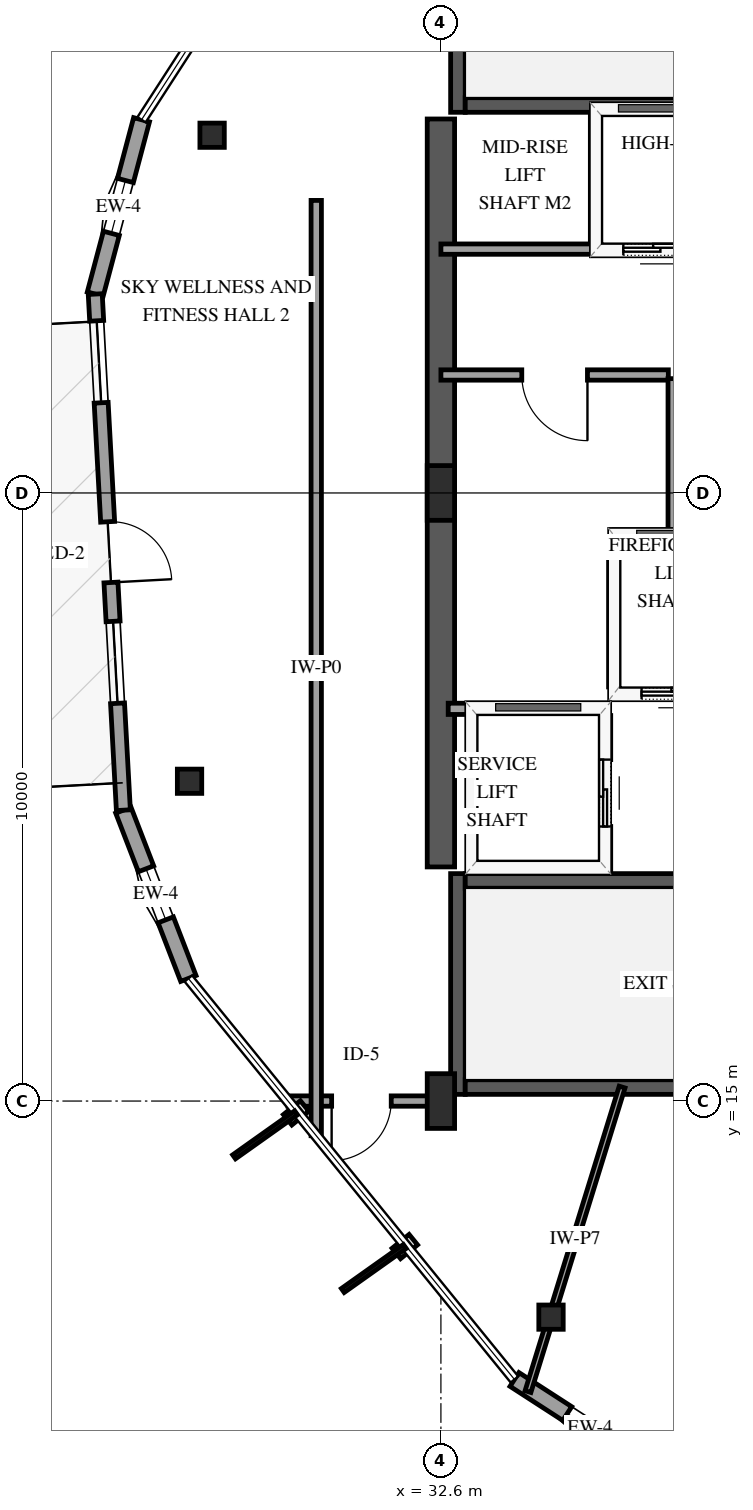
"""IFC4 building model, lengths in metres.
Left out: names, types, materials, properties, quantities, classifications, styles, units other than length and angle.
Written with IfcOpenShell. Run it as: python <this file> out.ifc"""

import sys

from ifc_helpers import new_model, si_unit, direction, frame, frame_2d, origin, origin_2d, place, context, subcontext, project, spatial, rectangle, i_section, extrude, element, fill, save


model = new_model("IFC4")
c1 = context("Model", 3, precision=1e-05, world=origin(), true_north=direction((0.0, 1.0)))
c2 = subcontext(c1, "Body", "Model", "MODEL_VIEW")
j1 = project(units=[si_unit("LENGTHUNIT", "METRE"), si_unit("PLANEANGLEUNIT", "RADIAN")], contexts=[c1])
p1 = place(None, origin())
s1 = spatial("IfcSite", under=j1, at=p1, CompositionType="ELEMENT")
p2 = place(p1, origin())
s2 = spatial("IfcBuilding", under=s1, at=p2, CompositionType="ELEMENT")
p3 = place(p2, frame((0.0, 0.0, 242.5)))
s3 = spatial("IfcBuildingStorey", under=s2, at=p3, CompositionType="ELEMENT", Elevation=242.5)
p4 = place(p3, frame((32.88, 15.11, 0.0), z_axis=(0.0, 0.0, 1.0), x_axis=(0.0, 1.0, 0.0)))
e1 = element("IfcWall", 1, at=p4, inside=s3, PredefinedType="SHEAR", context=c2, shape_type="SweptSolid", body=[
    extrude(rectangle(XDim=3.63, YDim=0.24, at=frame_2d((1.815, 0.0))), origin(), (0.0, 0.0, 1.0), 3.75),
])
for number, where, z_axis, x_axis in (
    (2, (33.0, 15.23, 0.0), (0.0, 0.0, 1.0), (1.0, 0.0, 0.0)),
    (3, (33.0, 18.62, 0.0), (0.0, 0.0, 1.0), (1.0, 0.0, 0.0)),
):
    element("IfcWall", number, at=place(p3, frame(where, z_axis=z_axis, x_axis=x_axis)), inside=s3, PredefinedType="SHEAR", context=c2, shape_type="SweptSolid", body=[
        extrude(rectangle(XDim=8.0, YDim=0.24, at=frame_2d((4.0, 0.0))), origin(), (0.0, 0.0, 1.0), 3.75),
    ])
p5 = place(p3, frame((32.88, 31.26, 0.0), z_axis=(0.0, 0.0, 1.0), x_axis=(0.0, 1.0, 0.0)))
e4 = element("IfcWall", 4, at=p5, inside=s3, PredefinedType="SHEAR", context=c2, shape_type="SweptSolid", body=[
    extrude(rectangle(XDim=3.63, YDim=0.24, at=frame_2d((1.815, 0.0))), origin(), (0.0, 0.0, 1.0), 3.75),
])
p6 = place(p3, frame((33.0, 31.38, 0.0), z_axis=(0.0, 0.0, 1.0), x_axis=(1.0, 0.0, 0.0)))
e5 = element("IfcWall", 5, at=p6, inside=s3, PredefinedType="SHEAR", context=c2, shape_type="SweptSolid", body=[
    extrude(rectangle(XDim=8.0, YDim=0.24, at=frame_2d((4.0, 0.0))), origin(), (0.0, 0.0, 1.0), 3.75),
])
p7 = place(p3, frame((32.6, 18.85, 0.0), z_axis=(0.0, 0.0, 1.0), x_axis=(0.0, 1.0, 0.0)))
e6 = element("IfcWall", 6, at=p7, inside=s3, PredefinedType="SHEAR", context=c2, shape_type="SweptSolid", body=[
    extrude(rectangle(XDim=12.3, YDim=0.45, at=frame_2d((6.15, 0.0))), origin(), (0.0, 0.0, 1.0), 3.75),
])
for number, where, z_axis, x_axis in (
    (7, (32.6, 15.0, -0.3), (0.0, 0.0, 1.0), (1.0, 0.0, 0.0)),
    (8, (32.6, 25.0, -0.3), (0.0, 0.0, 1.0), (1.0, 0.0, 0.0)),
):
    element("IfcColumn", number, at=place(p3, frame(where, z_axis=z_axis, x_axis=x_axis)), inside=s3, PredefinedType="PILASTER", context=c2, shape_type="SweptSolid", body=[
        extrude(rectangle(XDim=0.45, YDim=0.9, at=origin_2d()), origin(), (0.0, 0.0, 1.0), 4.05),
    ])
for number, where, z_axis, x_axis in (
    (9, (28.837, 30.883, -0.3), (0.0, 0.0, 1.0), (1.0, 0.0, 0.0)),
    (10, (28.466, 20.259, -0.3), (0.0, 0.0, 1.0), (1.0, 0.0, 0.0)),
    (11, (34.411, 11.446, -0.3), (0.0, 0.0, 1.0), (1.0, 0.0, 0.0)),
):
    element("IfcColumn", number, at=place(p3, frame(where, z_axis=z_axis, x_axis=x_axis)), inside=s3, PredefinedType="COLUMN", context=c2, shape_type="SweptSolid", body=[
        extrude(i_section(OverallWidth=0.401, OverallDepth=0.399, WebThickness=0.025, FlangeThickness=0.04, FilletRadius=0.038, at=origin_2d()), origin(), (0.0, 0.0, 1.0), 4.05),
    ])
p8 = place(p3, frame((27.677, 31.137, 0.0), z_axis=(0.0, 0.0, 1.0), x_axis=(-0.256781470725, -0.966469490616, 0.0)))
e12 = element("IfcWall", 12, at=p8, inside=s3, PredefinedType="SOLIDWALL", context=c2, shape_type="SweptSolid", body=[
    extrude(rectangle(XDim=2.966, YDim=0.27, at=frame_2d((1.483, 0.0))), origin(), (0.0, 0.0, 1.0), 2.829),
])
p9 = place(p8, frame((1.033, 0.0, 0.75)))
e13 = element("IfcOpeningElement", 13, at=p9, cuts=e12, PredefinedType="OPENING", context=c2, shape_type="SweptSolid", body=[
    extrude(rectangle(XDim=0.9, YDim=1.5, at=frame_2d((0.45, 0.75))), frame((0.0, 0.145, 0.0), z_axis=(0.0, -1.0, 0.0), x_axis=(1.0, 0.0, 0.0)), (0.0, 0.0, 1.0), 0.29),
])
p10 = place(p3, frame((27.378, 19.783, 0.0), z_axis=(0.0, 0.0, 1.0), x_axis=(0.3603683584, -0.93281008049, 0.0)))
e14 = element("IfcWall", 14, at=p10, inside=s3, PredefinedType="SOLIDWALL", context=c2, shape_type="SweptSolid", body=[
    extrude(rectangle(XDim=2.967, YDim=0.27, at=frame_2d((1.483, 0.0))), origin(), (0.0, 0.0, 1.0), 2.829),
])
p11 = place(p10, frame((1.033, 0.0, 0.75)))
e15 = element("IfcOpeningElement", 15, at=p11, cuts=e14, PredefinedType="OPENING", context=c2, shape_type="SweptSolid", body=[
    extrude(rectangle(XDim=0.9, YDim=1.5, at=frame_2d((0.45, 0.75))), frame((0.0, 0.145, 0.0), z_axis=(0.0, -1.0, 0.0), x_axis=(1.0, 0.0, 0.0)), (0.0, 0.0, 1.0), 0.29),
])
p12 = place(p3, frame((26.915, 28.271, 0.0), z_axis=(0.0, 0.0, 1.0), x_axis=(0.05442960739, -0.99851761018, 0.0)))
e16 = element("IfcWall", 16, at=p12, inside=s3, PredefinedType="SOLIDWALL", context=c2, shape_type="SweptSolid", body=[
    extrude(rectangle(XDim=8.5, YDim=0.23, at=frame_2d((4.25, 0.0))), origin(), (0.0, 0.0, 1.0), 2.829),
])
p13 = place(p12, frame((3.75, 0.0, 0.0)))
e17 = element("IfcOpeningElement", 17, at=p13, cuts=e16, PredefinedType="OPENING", context=c2, shape_type="SweptSolid", body=[
    extrude(rectangle(XDim=1.0, YDim=2.15, at=frame_2d((0.5, 1.075))), frame((0.0, 0.125, 0.0), z_axis=(0.0, -1.0, 0.0), x_axis=(1.0, 0.0, 0.0)), (0.0, 0.0, 1.0), 0.25),
])
p14 = place(p12, frame((0.44, 0.0, 0.72)))
e18 = element("IfcOpeningElement", 18, at=p14, cuts=e16, PredefinedType="OPENING", context=c2, shape_type="SweptSolid", body=[
    extrude(rectangle(XDim=1.35, YDim=1.65, at=frame_2d((0.675, 0.825))), frame((0.0, 0.125, 0.0), z_axis=(0.0, -1.0, 0.0), x_axis=(1.0, 0.0, 0.0)), (0.0, 0.0, 1.0), 0.25),
])
p15 = place(p12, frame((5.39, 0.0, 0.72)))
e19 = element("IfcOpeningElement", 19, at=p15, cuts=e16, PredefinedType="OPENING", context=c2, shape_type="SweptSolid", body=[
    extrude(rectangle(XDim=1.35, YDim=1.65, at=frame_2d((0.675, 0.825))), frame((0.0, 0.125, 0.0), z_axis=(0.0, -1.0, 0.0), x_axis=(1.0, 0.0, 0.0)), (0.0, 0.0, 1.0), 0.25),
])
p16 = place(p3, frame((33.81, 10.422, 0.0), z_axis=(0.0, 0.0, 1.0), x_axis=(0.839779856866, -0.54292705956, 0.0)))
e20 = element("IfcWall", 20, at=p16, inside=s3, PredefinedType="SOLIDWALL", context=c2, shape_type="SweptSolid", body=[
    extrude(rectangle(XDim=2.967, YDim=0.27, at=frame_2d((1.483, 0.0))), origin(), (0.0, 0.0, 1.0), 2.829),
])
p17 = place(p16, frame((1.033, 0.0, 0.75)))
e21 = element("IfcOpeningElement", 21, at=p17, cuts=e20, PredefinedType="OPENING", context=c2, shape_type="SweptSolid", body=[
    extrude(rectangle(XDim=0.9, YDim=1.5, at=frame_2d((0.45, 0.75))), frame((0.0, 0.145, 0.0), z_axis=(0.0, -1.0, 0.0), x_axis=(1.0, 0.0, 0.0)), (0.0, 0.0, 1.0), 0.29),
])
p18 = place(p3, frame((35.45, 21.7, 0.0), z_axis=(0.0, 0.0, 1.0), x_axis=(1.0, 0.0, 0.0)))
e22 = element("IfcWall", 22, at=p18, inside=s3, PredefinedType="SOLIDWALL", context=c2, shape_type="SweptSolid", body=[
    extrude(rectangle(XDim=2.0, YDim=0.185, at=frame_2d((1.0, 0.0))), origin(), (0.0, 0.0, 1.0), 3.45),
])
p19 = place(p18, frame((0.45, 0.0, 0.0)))
e23 = element("IfcOpeningElement", 23, at=p19, cuts=e22, PredefinedType="OPENING", context=c2, shape_type="SweptSolid", body=[
    extrude(rectangle(XDim=1.1, YDim=2.15, at=frame_2d((0.55, 1.075))), frame((0.0, 0.103, 0.0), z_axis=(0.0, -1.0, 0.0), x_axis=(1.0, 0.0, 0.0)), (0.0, 0.0, 1.0), 0.205),
])
p20 = place(p3, frame((35.45, 24.3, 0.0), z_axis=(0.0, 0.0, 1.0), x_axis=(1.0, 0.0, 0.0)))
e24 = element("IfcWall", 24, at=p20, inside=s3, PredefinedType="SOLIDWALL", context=c2, shape_type="SweptSolid", body=[
    extrude(rectangle(XDim=2.0, YDim=0.185, at=frame_2d((1.0, 0.0))), origin(), (0.0, 0.0, 1.0), 3.45),
])
p21 = place(p3, frame((35.45, 21.81, 0.0), z_axis=(0.0, 0.0, 1.0), x_axis=(0.0, 1.0, 0.0)))
e25 = element("IfcWall", 25, at=p21, inside=s3, PredefinedType="SOLIDWALL", context=c2, shape_type="SweptSolid", body=[
    extrude(rectangle(XDim=2.38, YDim=0.185, at=frame_2d((1.19, 0.0))), origin(), (0.0, 0.0, 1.0), 3.45),
])
p22 = place(p3, frame((32.72, 21.45, 0.0), z_axis=(0.0, 0.0, 1.0), x_axis=(1.0, 0.0, 0.0)))
e26 = element("IfcWall", 26, at=p22, inside=s3, PredefinedType="SOLIDWALL", context=c2, shape_type="SweptSolid", body=[
    extrude(rectangle(XDim=2.58, YDim=0.185, at=frame_2d((1.29, 0.0))), origin(), (0.0, 0.0, 1.0), 3.45),
])
p23 = place(p3, frame((35.3, 18.79, 0.0), z_axis=(0.0, 0.0, 1.0), x_axis=(0.0, 1.0, 0.0)))
e27 = element("IfcWall", 27, at=p23, inside=s3, PredefinedType="SOLIDWALL", context=c2, shape_type="SweptSolid", body=[
    extrude(rectangle(XDim=2.55, YDim=0.185, at=frame_2d((1.275, 0.0))), origin(), (0.0, 0.0, 1.0), 3.45),
])
p24 = place(p23, frame((0.725, 0.0, 0.0)))
e28 = element("IfcOpeningElement", 28, at=p24, cuts=e27, PredefinedType="OPENING", context=c2, shape_type="SweptSolid", body=[
    extrude(rectangle(XDim=1.1, YDim=2.15, at=frame_2d((0.55, 1.075))), frame((0.0, 0.103, 0.0), z_axis=(0.0, -1.0, 0.0), x_axis=(1.0, 0.0, 0.0)), (0.0, 0.0, 1.0), 0.205),
])
p25 = place(p3, frame((35.15, 29.0, 0.0), z_axis=(0.0, 0.0, 1.0), x_axis=(1.0, 0.0, 0.0)))
e29 = element("IfcWall", 29, at=p25, inside=s3, PredefinedType="SOLIDWALL", context=c2, shape_type="SweptSolid", body=[
    extrude(rectangle(XDim=2.0, YDim=0.185, at=frame_2d((1.0, 0.0))), origin(), (0.0, 0.0, 1.0), 3.45),
])
p26 = place(p25, frame((0.45, 0.0, 0.0)))
e30 = element("IfcOpeningElement", 30, at=p26, cuts=e29, PredefinedType="OPENING", context=c2, shape_type="SweptSolid", body=[
    extrude(rectangle(XDim=1.1, YDim=2.15, at=frame_2d((0.55, 1.075))), frame((0.0, 0.103, 0.0), z_axis=(0.0, -1.0, 0.0), x_axis=(1.0, 0.0, 0.0)), (0.0, 0.0, 1.0), 0.205),
])
p27 = place(p3, frame((35.15, 29.11, 0.0), z_axis=(0.0, 0.0, 1.0), x_axis=(0.0, 1.0, 0.0)))
e31 = element("IfcWall", 31, at=p27, inside=s3, PredefinedType="SOLIDWALL", context=c2, shape_type="SweptSolid", body=[
    extrude(rectangle(XDim=2.1, YDim=0.185, at=frame_2d((1.05, 0.0))), origin(), (0.0, 0.0, 1.0), 3.45),
])
p28 = place(p3, frame((35.58, 15.23, 0.0), z_axis=(0.0, 0.0, 1.0), x_axis=(-0.295332551785, -0.955394517389, 0.0)))
e32 = element("IfcWall", 32, at=p28, inside=s3, PredefinedType="PARTITIONING", context=c2, shape_type="SweptSolid", body=[
    extrude(rectangle(XDim=5.242, YDim=0.1, at=frame_2d((2.621, 0.0))), origin(), (0.0, 0.0, 1.0), 2.745),
])
p29 = place(p3, frame((36.34, 26.94, 0.0), z_axis=(0.0, 0.0, 1.0), x_axis=(-1.0, 0.0, 0.0)))
e33 = element("IfcWall", 33, at=p29, inside=s3, PredefinedType="PARTITIONING", context=c2, shape_type="SweptSolid", body=[
    extrude(rectangle(XDim=3.74, YDim=0.17, at=frame_2d((1.87, 0.0))), origin(), (0.0, 0.0, 1.0), 3.45),
])
p30 = place(p29, frame((1.33, 0.0, 0.0)))
e34 = element("IfcOpeningElement", 34, at=p30, cuts=e33, PredefinedType="OPENING", context=c2, shape_type="SweptSolid", body=[
    extrude(rectangle(XDim=1.08, YDim=2.15, at=frame_2d((0.54, 1.075))), frame((0.0, 0.095, 0.0), z_axis=(0.0, -1.0, 0.0), x_axis=(1.0, 0.0, 0.0)), (0.0, 0.0, 1.0), 0.19),
])
p31 = place(p3, frame((36.4, 26.88, 0.0), z_axis=(0.0, 0.0, 1.0), x_axis=(0.0, -1.0, 0.0)))
e35 = element("IfcWall", 35, at=p31, inside=s3, PredefinedType="PARTITIONING", context=c2, shape_type="SweptSolid", body=[
    extrude(rectangle(XDim=2.58, YDim=0.13, at=frame_2d((1.29, 0.0))), origin(), (0.0, 0.0, 1.0), 3.45),
])
p32 = place(p3, frame((32.6, 29.01, 0.0), z_axis=(0.0, 0.0, 1.0), x_axis=(1.0, 0.0, 0.0)))
e36 = element("IfcWall", 36, at=p32, inside=s3, PredefinedType="PARTITIONING", context=c2, shape_type="SweptSolid", body=[
    extrude(rectangle(XDim=2.55, YDim=0.17, at=frame_2d((1.275, 0.0))), origin(), (0.0, 0.0, 1.0), 3.45),
])
p33 = place(p3, frame((32.53, 15.0, 0.0), z_axis=(0.0, 0.0, 1.0), x_axis=(-1.0, 0.0, 0.0)))
e37 = element("IfcWall", 37, at=p33, inside=s3, PredefinedType="PARTITIONING", context=c2, shape_type="SweptSolid", body=[
    extrude(rectangle(XDim=2.444, YDim=0.17, at=frame_2d((1.222, 0.0))), origin(), (0.0, 0.0, 1.0), 3.45),
])
p34 = place(p33, frame((0.747, 0.0, 0.0)))
e38 = element("IfcOpeningElement", 38, at=p34, cuts=e37, PredefinedType="OPENING", context=c2, shape_type="SweptSolid", body=[
    extrude(rectangle(XDim=0.98, YDim=2.15, at=frame_2d((0.49, 1.075))), frame((0.0, 0.095, 0.0), z_axis=(0.0, -1.0, 0.0), x_axis=(1.0, 0.0, 0.0)), (0.0, 0.0, 1.0), 0.19),
])
p35 = place(p3, frame((30.55, 14.43, 0.0), z_axis=(0.0, 0.0, 1.0), x_axis=(0.0, 1.0, 0.0)))
e39 = element("IfcWall", 39, at=p35, inside=s3, PredefinedType="PARTITIONING", context=c2, shape_type="SweptSolid", body=[
    extrude(rectangle(XDim=15.381, YDim=0.17, at=frame_2d((7.69, 0.0))), origin(), (0.0, 0.0, 1.0), 3.45),
])
p36 = place(p9, origin())
e40 = element("IfcWindow", 40, at=p36, inside=s3, PartitioningType="SINGLE_PANEL", PredefinedType="WINDOW", context=c2, shape_type="SweptSolid", body=[
    extrude(rectangle(XDim=0.9, YDim=1.5, at=frame_2d((0.45, 0.75))), frame((0.0, 0.03, 0.0), z_axis=(0.0, -1.0, 0.0), x_axis=(1.0, 0.0, 0.0)), (0.0, 0.0, 1.0), 0.06),
])
fill(e13, e40)
p37 = place(p11, origin())
e41 = element("IfcWindow", 41, at=p37, inside=s3, PartitioningType="SINGLE_PANEL", PredefinedType="WINDOW", context=c2, shape_type="SweptSolid", body=[
    extrude(rectangle(XDim=0.9, YDim=1.5, at=frame_2d((0.45, 0.75))), frame((0.0, 0.03, 0.0), z_axis=(0.0, -1.0, 0.0), x_axis=(1.0, 0.0, 0.0)), (0.0, 0.0, 1.0), 0.06),
])
fill(e15, e41)
p38 = place(p13, origin())
e42 = element("IfcDoor", 42, at=p38, inside=s3, OperationType="SINGLE_SWING_RIGHT", PredefinedType="DOOR", context=c2, shape_type="SweptSolid", body=[
    extrude(rectangle(XDim=1.0, YDim=2.15, at=frame_2d((0.5, 1.075))), frame((0.0, 0.025, 0.0), z_axis=(0.0, -1.0, 0.0), x_axis=(1.0, 0.0, 0.0)), (0.0, 0.0, 1.0), 0.05),
])
fill(e17, e42)
p39 = place(p14, origin())
e43 = element("IfcWindow", 43, at=p39, inside=s3, PartitioningType="SINGLE_PANEL", PredefinedType="WINDOW", context=c2, shape_type="SweptSolid", body=[
    extrude(rectangle(XDim=1.35, YDim=1.65, at=frame_2d((0.675, 0.825))), frame((0.0, 0.03, 0.0), z_axis=(0.0, -1.0, 0.0), x_axis=(1.0, 0.0, 0.0)), (0.0, 0.0, 1.0), 0.06),
])
fill(e18, e43)
p40 = place(p15, origin())
e44 = element("IfcWindow", 44, at=p40, inside=s3, PartitioningType="SINGLE_PANEL", PredefinedType="WINDOW", context=c2, shape_type="SweptSolid", body=[
    extrude(rectangle(XDim=1.35, YDim=1.65, at=frame_2d((0.675, 0.825))), frame((0.0, 0.03, 0.0), z_axis=(0.0, -1.0, 0.0), x_axis=(1.0, 0.0, 0.0)), (0.0, 0.0, 1.0), 0.06),
])
fill(e19, e44)
p41 = place(p17, origin())
e45 = element("IfcWindow", 45, at=p41, inside=s3, PartitioningType="SINGLE_PANEL", PredefinedType="WINDOW", context=c2, shape_type="SweptSolid", body=[
    extrude(rectangle(XDim=0.9, YDim=1.5, at=frame_2d((0.45, 0.75))), frame((0.0, 0.03, 0.0), z_axis=(0.0, -1.0, 0.0), x_axis=(1.0, 0.0, 0.0)), (0.0, 0.0, 1.0), 0.06),
])
fill(e21, e45)
p42 = place(p19, origin())
e46 = element("IfcDoor", 46, at=p42, inside=s3, OperationType="SLIDING_TO_LEFT", PredefinedType="DOOR", context=c2, shape_type="SweptSolid", body=[
    extrude(rectangle(XDim=1.1, YDim=2.15, at=frame_2d((0.55, 1.075))), frame((0.0, 0.025, 0.0), z_axis=(0.0, -1.0, 0.0), x_axis=(1.0, 0.0, 0.0)), (0.0, 0.0, 1.0), 0.05),
])
fill(e23, e46)
p43 = place(p24, origin())
e47 = element("IfcDoor", 47, at=p43, inside=s3, OperationType="SLIDING_TO_LEFT", PredefinedType="DOOR", context=c2, shape_type="SweptSolid", body=[
    extrude(rectangle(XDim=1.1, YDim=2.15, at=frame_2d((0.55, 1.075))), frame((0.0, 0.025, 0.0), z_axis=(0.0, -1.0, 0.0), x_axis=(1.0, 0.0, 0.0)), (0.0, 0.0, 1.0), 0.05),
])
fill(e28, e47)
p44 = place(p26, origin())
e48 = element("IfcDoor", 48, at=p44, inside=s3, OperationType="SLIDING_TO_LEFT", PredefinedType="DOOR", context=c2, shape_type="SweptSolid", body=[
    extrude(rectangle(XDim=1.1, YDim=2.15, at=frame_2d((0.55, 1.075))), frame((0.0, 0.025, 0.0), z_axis=(0.0, -1.0, 0.0), x_axis=(1.0, 0.0, 0.0)), (0.0, 0.0, 1.0), 0.05),
])
fill(e30, e48)
p45 = place(p30, origin())
e49 = element("IfcDoor", 49, at=p45, inside=s3, OperationType="SINGLE_SWING_LEFT", PredefinedType="DOOR", context=c2, shape_type="SweptSolid", body=[
    extrude(rectangle(XDim=1.08, YDim=2.15, at=frame_2d((0.54, 1.075))), frame((0.0, 0.025, 0.0), z_axis=(0.0, -1.0, 0.0), x_axis=(1.0, 0.0, 0.0)), (0.0, 0.0, 1.0), 0.05),
])
fill(e34, e49)
p46 = place(p34, origin())
e50 = element("IfcDoor", 50, at=p46, inside=s3, OperationType="SINGLE_SWING_RIGHT", PredefinedType="DOOR", context=c2, shape_type="SweptSolid", body=[
    extrude(rectangle(XDim=0.98, YDim=2.15, at=frame_2d((0.49, 1.075))), frame((0.0, 0.025, 0.0), z_axis=(0.0, -1.0, 0.0), x_axis=(1.0, 0.0, 0.0)), (0.0, 0.0, 1.0), 0.05),
])
fill(e38, e50)
save(model, sys.argv[1])
